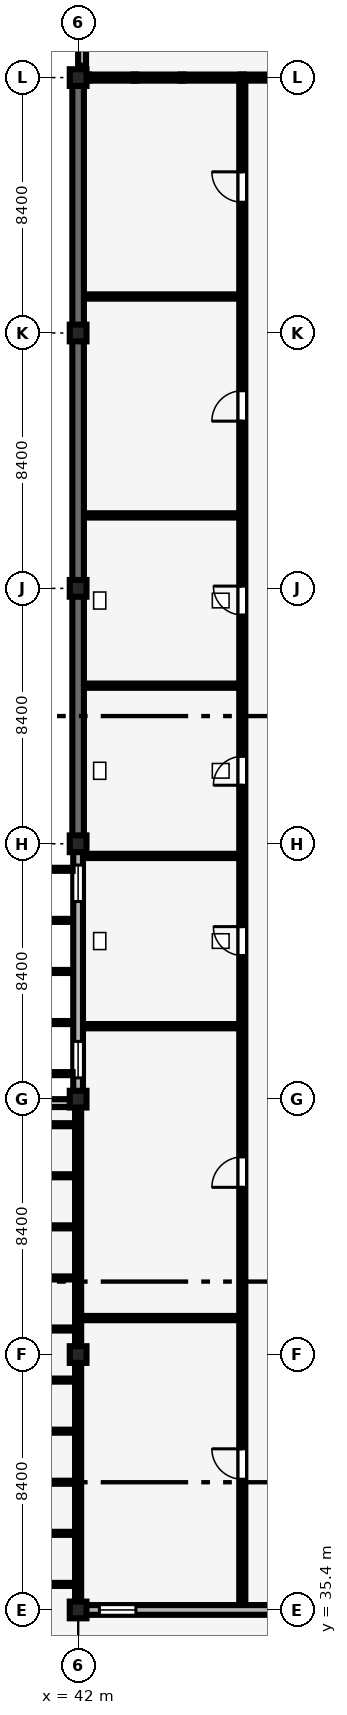
"""IFC4 building model, lengths in metres.
Left out: names, types, materials, properties, quantities, classifications, styles, units other than length and angle.
Written with IfcOpenShell. Run it as: python <this file> out.ifc"""

import sys

from ifc_helpers import new_model, si_unit, direction, frame, frame_2d, origin, origin_2d, place, context, subcontext, project, spatial, rectangle, extrude, element, fill, save


model = new_model("IFC4")
c1 = context("Model", 3, precision=1e-05, world=origin(), true_north=direction((0.0, 1.0)))
c2 = subcontext(c1, "Body", "Model", "MODEL_VIEW")
j1 = project(units=[si_unit("LENGTHUNIT", "METRE"), si_unit("PLANEANGLEUNIT", "RADIAN")], contexts=[c1])
p1 = place(None, origin())
s1 = spatial("IfcSite", under=j1, at=p1, CompositionType="ELEMENT")
p2 = place(p1, origin())
s2 = spatial("IfcBuilding", under=s1, at=p2, CompositionType="ELEMENT")
p3 = place(p2, frame((0.0, 0.0, 9.0)))
s3 = spatial("IfcBuildingStorey", under=s2, at=p3, CompositionType="ELEMENT", Elevation=9.0)
for number, where, z_axis, x_axis in (
    (1, (42.0, 35.4, 0.0), (0.0, 0.0, 1.0), (1.0, 0.0, 0.0)),
    (2, (42.0, 43.8, 0.0), (0.0, 0.0, 1.0), (1.0, 0.0, 0.0)),
    (3, (42.0, 52.2, 0.0), (0.0, 0.0, 1.0), (1.0, 0.0, 0.0)),
    (4, (42.0, 60.6, 0.0), (0.0, 0.0, 1.0), (1.0, 0.0, 0.0)),
    (5, (42.0, 69.0, 0.0), (0.0, 0.0, 1.0), (1.0, 0.0, 0.0)),
    (6, (42.0, 77.4, 0.0), (0.0, 0.0, 1.0), (1.0, 0.0, 0.0)),
    (7, (42.0, 85.8, 0.0), (0.0, 0.0, 1.0), (1.0, 0.0, 0.0)),
):
    element("IfcColumn", number, at=place(p3, frame(where, z_axis=z_axis, x_axis=x_axis)), inside=s3, PredefinedType="COLUMN", context=c2, shape_type="SweptSolid", body=[
        extrude(rectangle(XDim=0.55, YDim=0.55, at=origin_2d()), origin(), (0.0, 0.0, 1.0), 4.2),
    ])
p4 = place(p3, frame((42.0, 52.45, 0.0), z_axis=(0.0, 0.0, 1.0), x_axis=(0.0, 1.0, 0.0)))
e8 = element("IfcWall", 8, at=p4, inside=s3, PredefinedType="SOLIDWALL", context=c2, shape_type="SweptSolid", body=[
    extrude(rectangle(XDim=7.9, YDim=0.32, at=frame_2d((3.95, 0.0))), origin(), (0.0, 0.0, 1.0), 2.96),
])
p5 = place(p4, frame((0.45, 0.0, 0.85)))
e9 = element("IfcOpeningElement", 9, at=p5, cuts=e8, PredefinedType="OPENING", context=c2, shape_type="SweptSolid", body=[
    extrude(rectangle(XDim=1.2, YDim=1.5, at=frame_2d((0.6, 0.75))), frame((0.0, 0.17, 0.0), z_axis=(0.0, -1.0, 0.0), x_axis=(1.0, 0.0, 0.0)), (0.0, 0.0, 1.0), 0.34),
])
p6 = place(p4, frame((6.25, 0.0, 0.85)))
e10 = element("IfcOpeningElement", 10, at=p6, cuts=e8, PredefinedType="OPENING", context=c2, shape_type="SweptSolid", body=[
    extrude(rectangle(XDim=1.2, YDim=1.5, at=frame_2d((0.6, 0.75))), frame((0.0, 0.17, 0.0), z_axis=(0.0, -1.0, 0.0), x_axis=(1.0, 0.0, 0.0)), (0.0, 0.0, 1.0), 0.34),
])
p7 = place(p3, frame((42.0, 60.85, 0.0), z_axis=(0.0, 0.0, 1.0), x_axis=(0.0, 1.0, 0.0)))
e11 = element("IfcWall", 11, at=p7, inside=s3, PredefinedType="SHEAR", context=c2, shape_type="SweptSolid", body=[
    extrude(rectangle(XDim=7.9, YDim=0.38, at=frame_2d((3.95, 0.0))), origin(), (0.0, 0.0, 1.0), 2.91),
])
p8 = place(p3, frame((42.0, 69.25, 0.0), z_axis=(0.0, 0.0, 1.0), x_axis=(0.0, 1.0, 0.0)))
e12 = element("IfcWall", 12, at=p8, inside=s3, PredefinedType="SHEAR", context=c2, shape_type="SweptSolid", body=[
    extrude(rectangle(XDim=7.9, YDim=0.38, at=frame_2d((3.95, 0.0))), origin(), (0.0, 0.0, 1.0), 2.81),
])
p9 = place(p3, frame((42.0, 77.65, 0.0), z_axis=(0.0, 0.0, 1.0), x_axis=(0.0, 1.0, 0.0)))
e13 = element("IfcWall", 13, at=p9, inside=s3, PredefinedType="SHEAR", context=c2, shape_type="SweptSolid", body=[
    extrude(rectangle(XDim=7.9, YDim=0.38, at=frame_2d((3.95, 0.0))), origin(), (0.0, 0.0, 1.0), 3.36),
])
p10 = place(p3, frame((42.25, 35.4, 0.0), z_axis=(0.0, 0.0, 1.0), x_axis=(1.0, 0.0, 0.0)))
e14 = element("IfcWall", 14, at=p10, inside=s3, PredefinedType="SOLIDWALL", context=c2, shape_type="SweptSolid", body=[
    extrude(rectangle(XDim=7.9, YDim=0.32, at=frame_2d((3.95, 0.0))), origin(), (0.0, 0.0, 1.0), 2.96),
])
p11 = place(p10, frame((0.45, 0.0, 0.9)))
e15 = element("IfcOpeningElement", 15, at=p11, cuts=e14, PredefinedType="OPENING", context=c2, shape_type="SweptSolid", body=[
    extrude(rectangle(XDim=1.2, YDim=1.5, at=frame_2d((0.6, 0.75))), frame((0.0, 0.17, 0.0), z_axis=(0.0, -1.0, 0.0), x_axis=(1.0, 0.0, 0.0)), (0.0, 0.0, 1.0), 0.34),
])
p12 = place(p10, frame((6.25, 0.0, 0.9)))
e16 = element("IfcOpeningElement", 16, at=p12, cuts=e14, PredefinedType="OPENING", context=c2, shape_type="SweptSolid", body=[
    extrude(rectangle(XDim=1.2, YDim=1.8, at=frame_2d((0.6, 0.9))), frame((0.0, 0.17, 0.0), z_axis=(0.0, -1.0, 0.0), x_axis=(1.0, 0.0, 0.0)), (0.0, 0.0, 1.0), 0.34),
])
p13 = place(p3, frame((42.13, 86.19, 0.0), z_axis=(0.0, 0.0, 1.0), x_axis=(0.0, 1.0, 0.0)))
e17 = element("IfcWall", 17, at=p13, inside=s3, PredefinedType="PARAPET", context=c2, shape_type="SweptSolid", body=[
    extrude(rectangle(XDim=8.22, YDim=0.26, at=frame_2d((4.11, 0.0))), origin(), (0.0, 0.0, 1.0), 0.85),
])
p14 = place(p3, frame((25.33, 52.07, 0.0), z_axis=(0.0, 0.0, 1.0), x_axis=(1.0, 0.0, 0.0)))
e18 = element("IfcWall", 18, at=p14, inside=s3, PredefinedType="PARAPET", context=c2, shape_type="SweptSolid", body=[
    extrude(rectangle(XDim=16.54, YDim=0.26, at=frame_2d((8.27, 0.0))), origin(), (0.0, 0.0, 1.0), 0.85),
])
p15 = place(p3, frame((42.105, 45.0, 0.0), z_axis=(0.0, 0.0, 1.0), x_axis=(1.0, 0.0, 0.0)))
e19 = element("IfcWall", 19, at=p15, inside=s3, PredefinedType="PARTITIONING", context=c2, shape_type="SweptSolid", body=[
    extrude(rectangle(XDim=5.19, YDim=0.14, at=frame_2d((2.595, 0.0))), origin(), (0.0, 0.0, 1.0), 3.9),
])
p16 = place(p3, frame((42.165, 54.6, 0.0), z_axis=(0.0, 0.0, 1.0), x_axis=(1.0, 0.0, 0.0)))
e20 = element("IfcWall", 20, at=p16, inside=s3, PredefinedType="PARTITIONING", context=c2, shape_type="SweptSolid", body=[
    extrude(rectangle(XDim=5.13, YDim=0.14, at=frame_2d((2.565, 0.0))), origin(), (0.0, 0.0, 1.0), 3.51),
])
p17 = place(p3, frame((42.165, 60.2, 0.0), z_axis=(0.0, 0.0, 1.0), x_axis=(1.0, 0.0, 0.0)))
e21 = element("IfcWall", 21, at=p17, inside=s3, PredefinedType="PARTITIONING", context=c2, shape_type="SweptSolid", body=[
    extrude(rectangle(XDim=5.13, YDim=0.14, at=frame_2d((2.565, 0.0))), origin(), (0.0, 0.0, 1.0), 2.96),
])
p18 = place(p3, frame((42.195, 65.8, 0.0), z_axis=(0.0, 0.0, 1.0), x_axis=(1.0, 0.0, 0.0)))
e22 = element("IfcWall", 22, at=p18, inside=s3, PredefinedType="PARTITIONING", context=c2, shape_type="SweptSolid", body=[
    extrude(rectangle(XDim=5.1, YDim=0.14, at=frame_2d((2.55, 0.0))), origin(), (0.0, 0.0, 1.0), 3.9),
])
p19 = place(p3, frame((42.195, 71.4, 0.0), z_axis=(0.0, 0.0, 1.0), x_axis=(1.0, 0.0, 0.0)))
e23 = element("IfcWall", 23, at=p19, inside=s3, PredefinedType="PARTITIONING", context=c2, shape_type="SweptSolid", body=[
    extrude(rectangle(XDim=5.1, YDim=0.14, at=frame_2d((2.55, 0.0))), origin(), (0.0, 0.0, 1.0), 3.51),
])
p20 = place(p3, frame((42.195, 78.6, 0.0), z_axis=(0.0, 0.0, 1.0), x_axis=(1.0, 0.0, 0.0)))
e24 = element("IfcWall", 24, at=p20, inside=s3, PredefinedType="PARTITIONING", context=c2, shape_type="SweptSolid", body=[
    extrude(rectangle(XDim=5.1, YDim=0.14, at=frame_2d((2.55, 0.0))), origin(), (0.0, 0.0, 1.0), 3.9),
])
p21 = place(p3, frame((47.4, 35.565, 0.0), z_axis=(0.0, 0.0, 1.0), x_axis=(0.0, 1.0, 0.0)))
e25 = element("IfcWall", 25, at=p21, inside=s3, PredefinedType="PARTITIONING", context=c2, shape_type="SweptSolid", body=[
    extrude(rectangle(XDim=50.13, YDim=0.2, at=frame_2d((25.065, 0.0))), origin(), (0.0, 0.0, 1.0), 3.9),
])
p22 = place(p21, frame((4.135, 0.0, 0.0)))
e26 = element("IfcOpeningElement", 26, at=p22, cuts=e25, PredefinedType="OPENING", context=c2, shape_type="SweptSolid", body=[
    extrude(rectangle(XDim=1.0, YDim=2.15, at=frame_2d((0.5, 1.075))), frame((0.0, 0.11, 0.0), z_axis=(0.0, -1.0, 0.0), x_axis=(1.0, 0.0, 0.0)), (0.0, 0.0, 1.0), 0.22),
])
p23 = place(p21, frame((13.735, 0.0, 0.0)))
e27 = element("IfcOpeningElement", 27, at=p23, cuts=e25, PredefinedType="OPENING", context=c2, shape_type="SweptSolid", body=[
    extrude(rectangle(XDim=1.0, YDim=2.15, at=frame_2d((0.5, 1.075))), frame((0.0, 0.11, 0.0), z_axis=(0.0, -1.0, 0.0), x_axis=(1.0, 0.0, 0.0)), (0.0, 0.0, 1.0), 0.22),
])
p24 = place(p21, frame((21.36, 0.0, 0.0)))
e28 = element("IfcOpeningElement", 28, at=p24, cuts=e25, PredefinedType="OPENING", context=c2, shape_type="SweptSolid", body=[
    extrude(rectangle(XDim=0.95, YDim=2.2, at=frame_2d((0.475, 1.1))), frame((0.0, 0.11, 0.0), z_axis=(0.0, -1.0, 0.0), x_axis=(1.0, 0.0, 0.0)), (0.0, 0.0, 1.0), 0.22),
])
p25 = place(p21, frame((26.96, 0.0, 0.0)))
e29 = element("IfcOpeningElement", 29, at=p25, cuts=e25, PredefinedType="OPENING", context=c2, shape_type="SweptSolid", body=[
    extrude(rectangle(XDim=0.95, YDim=2.2, at=frame_2d((0.475, 1.1))), frame((0.0, 0.11, 0.0), z_axis=(0.0, -1.0, 0.0), x_axis=(1.0, 0.0, 0.0)), (0.0, 0.0, 1.0), 0.22),
])
p26 = place(p21, frame((32.56, 0.0, 0.0)))
e30 = element("IfcOpeningElement", 30, at=p26, cuts=e25, PredefinedType="OPENING", context=c2, shape_type="SweptSolid", body=[
    extrude(rectangle(XDim=0.95, YDim=2.1, at=frame_2d((0.475, 1.05))), frame((0.0, 0.11, 0.0), z_axis=(0.0, -1.0, 0.0), x_axis=(1.0, 0.0, 0.0)), (0.0, 0.0, 1.0), 0.22),
])
p27 = place(p21, frame((38.935, 0.0, 0.0)))
e31 = element("IfcOpeningElement", 31, at=p27, cuts=e25, PredefinedType="OPENING", context=c2, shape_type="SweptSolid", body=[
    extrude(rectangle(XDim=1.0, YDim=2.15, at=frame_2d((0.5, 1.075))), frame((0.0, 0.11, 0.0), z_axis=(0.0, -1.0, 0.0), x_axis=(1.0, 0.0, 0.0)), (0.0, 0.0, 1.0), 0.22),
])
p28 = place(p21, frame((46.135, 0.0, 0.0)))
e32 = element("IfcOpeningElement", 32, at=p28, cuts=e25, PredefinedType="OPENING", context=c2, shape_type="SweptSolid", body=[
    extrude(rectangle(XDim=1.0, YDim=2.15, at=frame_2d((0.5, 1.075))), frame((0.0, 0.11, 0.0), z_axis=(0.0, -1.0, 0.0), x_axis=(1.0, 0.0, 0.0)), (0.0, 0.0, 1.0), 0.22),
])
p29 = place(p5, origin())
e33 = element("IfcWindow", 33, at=p29, inside=s3, PartitioningType="SINGLE_PANEL", PredefinedType="WINDOW", context=c2, shape_type="SweptSolid", body=[
    extrude(rectangle(XDim=1.2, YDim=1.5, at=frame_2d((0.6, 0.75))), frame((0.0, 0.03, 0.0), z_axis=(0.0, -1.0, 0.0), x_axis=(1.0, 0.0, 0.0)), (0.0, 0.0, 1.0), 0.06),
])
fill(e9, e33)
p30 = place(p6, origin())
e34 = element("IfcWindow", 34, at=p30, inside=s3, PartitioningType="SINGLE_PANEL", PredefinedType="WINDOW", context=c2, shape_type="SweptSolid", body=[
    extrude(rectangle(XDim=1.2, YDim=1.5, at=frame_2d((0.6, 0.75))), frame((0.0, 0.03, 0.0), z_axis=(0.0, -1.0, 0.0), x_axis=(1.0, 0.0, 0.0)), (0.0, 0.0, 1.0), 0.06),
])
fill(e10, e34)
p31 = place(p11, origin())
e35 = element("IfcWindow", 35, at=p31, inside=s3, PartitioningType="SINGLE_PANEL", PredefinedType="WINDOW", context=c2, shape_type="SweptSolid", body=[
    extrude(rectangle(XDim=1.2, YDim=1.5, at=frame_2d((0.6, 0.75))), frame((0.0, 0.03, 0.0), z_axis=(0.0, -1.0, 0.0), x_axis=(1.0, 0.0, 0.0)), (0.0, 0.0, 1.0), 0.06),
])
fill(e15, e35)
p32 = place(p22, origin())
e36 = element("IfcDoor", 36, at=p32, inside=s3, OperationType="SINGLE_SWING_RIGHT", PredefinedType="DOOR", context=c2, shape_type="SweptSolid", body=[
    extrude(rectangle(XDim=1.0, YDim=2.15, at=frame_2d((0.5, 1.075))), frame((0.0, 0.025, 0.0), z_axis=(0.0, -1.0, 0.0), x_axis=(1.0, 0.0, 0.0)), (0.0, 0.0, 1.0), 0.05),
])
fill(e26, e36)
p33 = place(p23, origin())
e37 = element("IfcDoor", 37, at=p33, inside=s3, OperationType="SINGLE_SWING_LEFT", PredefinedType="DOOR", context=c2, shape_type="SweptSolid", body=[
    extrude(rectangle(XDim=1.0, YDim=2.15, at=frame_2d((0.5, 1.075))), frame((0.0, 0.025, 0.0), z_axis=(0.0, -1.0, 0.0), x_axis=(1.0, 0.0, 0.0)), (0.0, 0.0, 1.0), 0.05),
])
fill(e27, e37)
p34 = place(p24, origin())
e38 = element("IfcDoor", 38, at=p34, inside=s3, OperationType="SINGLE_SWING_RIGHT", PredefinedType="DOOR", context=c2, shape_type="SweptSolid", body=[
    extrude(rectangle(XDim=0.95, YDim=2.2, at=frame_2d((0.475, 1.1))), frame((0.0, 0.025, 0.0), z_axis=(0.0, -1.0, 0.0), x_axis=(1.0, 0.0, 0.0)), (0.0, 0.0, 1.0), 0.05),
])
fill(e28, e38)
p35 = place(p25, origin())
e39 = element("IfcDoor", 39, at=p35, inside=s3, OperationType="SINGLE_SWING_LEFT", PredefinedType="DOOR", context=c2, shape_type="SweptSolid", body=[
    extrude(rectangle(XDim=0.95, YDim=2.2, at=frame_2d((0.475, 1.1))), frame((0.0, 0.025, 0.0), z_axis=(0.0, -1.0, 0.0), x_axis=(1.0, 0.0, 0.0)), (0.0, 0.0, 1.0), 0.05),
])
fill(e29, e39)
p36 = place(p26, origin())
e40 = element("IfcDoor", 40, at=p36, inside=s3, OperationType="SINGLE_SWING_RIGHT", PredefinedType="DOOR", context=c2, shape_type="SweptSolid", body=[
    extrude(rectangle(XDim=0.95, YDim=2.1, at=frame_2d((0.475, 1.05))), frame((0.0, 0.025, 0.0), z_axis=(0.0, -1.0, 0.0), x_axis=(1.0, 0.0, 0.0)), (0.0, 0.0, 1.0), 0.05),
])
fill(e30, e40)
p37 = place(p27, origin())
e41 = element("IfcDoor", 41, at=p37, inside=s3, OperationType="SINGLE_SWING_LEFT", PredefinedType="DOOR", context=c2, shape_type="SweptSolid", body=[
    extrude(rectangle(XDim=1.0, YDim=2.15, at=frame_2d((0.5, 1.075))), frame((0.0, 0.025, 0.0), z_axis=(0.0, -1.0, 0.0), x_axis=(1.0, 0.0, 0.0)), (0.0, 0.0, 1.0), 0.05),
])
fill(e31, e41)
p38 = place(p28, origin())
e42 = element("IfcDoor", 42, at=p38, inside=s3, OperationType="SINGLE_SWING_RIGHT", PredefinedType="DOOR", context=c2, shape_type="SweptSolid", body=[
    extrude(rectangle(XDim=1.0, YDim=2.15, at=frame_2d((0.5, 1.075))), frame((0.0, 0.025, 0.0), z_axis=(0.0, -1.0, 0.0), x_axis=(1.0, 0.0, 0.0)), (0.0, 0.0, 1.0), 0.05),
])
fill(e32, e42)
save(model, sys.argv[1])
